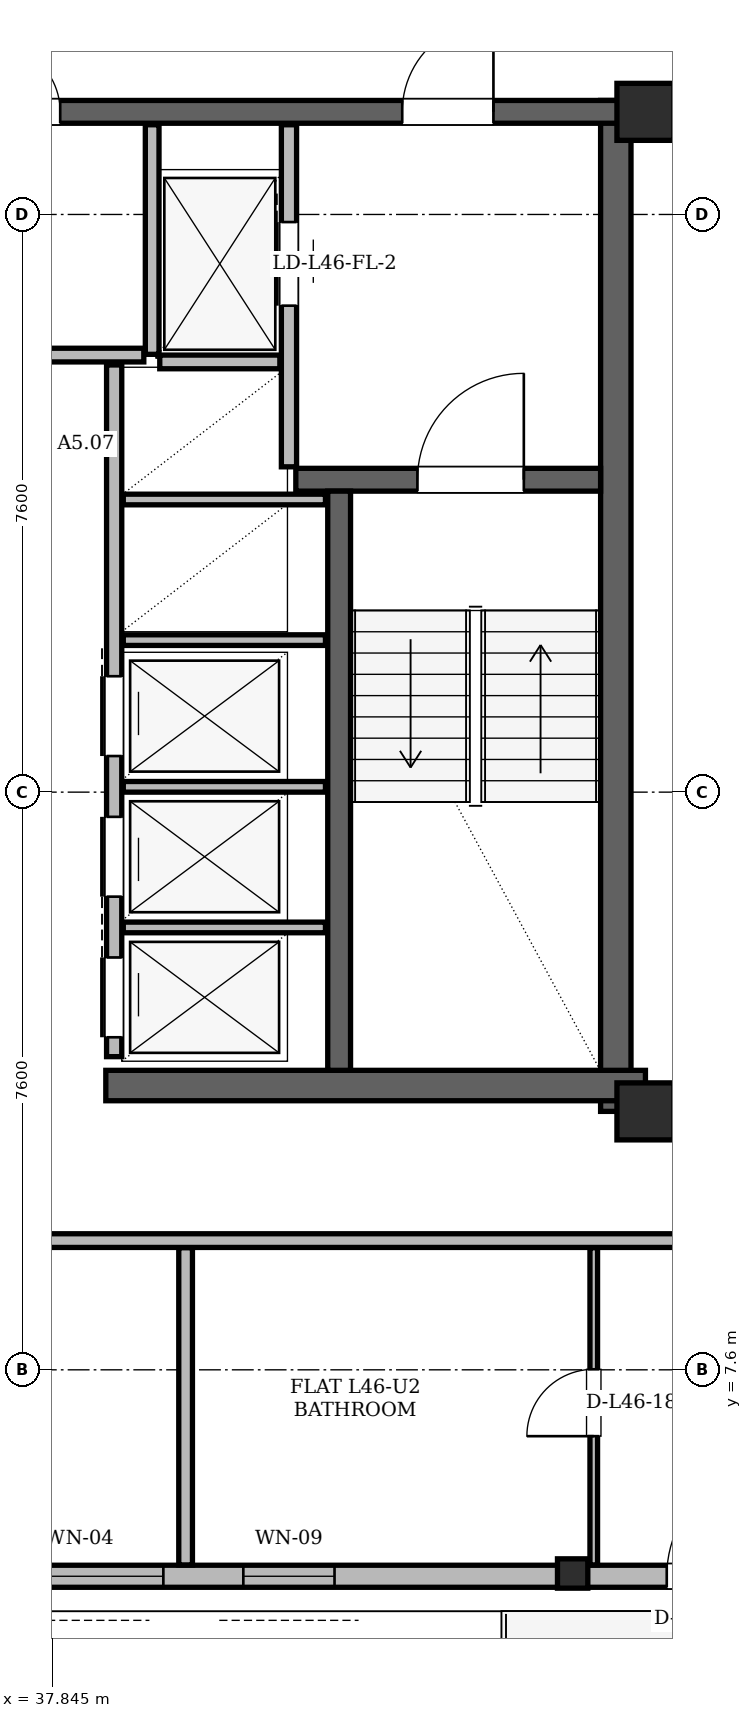
"""IFC4 building model, lengths in metres.
Left out: names, types, materials, properties, quantities, classifications, styles, units other than length and angle.
Written with IfcOpenShell. Run it as: python <this file> out.ifc"""

import sys

from ifc_helpers import new_model, si_unit, direction, frame, frame_2d, origin, origin_2d, place, context, subcontext, project, spatial, rectangle, hollow_rectangle, i_section, extrude, element, fill, save


model = new_model("IFC4")
c1 = context("Model", 3, precision=1e-05, world=origin(), true_north=direction((0.0, 1.0)))
c2 = subcontext(c1, "Body", "Model", "MODEL_VIEW")
j1 = project(units=[si_unit("LENGTHUNIT", "METRE"), si_unit("PLANEANGLEUNIT", "RADIAN")], contexts=[c1])
p1 = place(None, origin())
s1 = spatial("IfcSite", under=j1, at=p1, CompositionType="ELEMENT")
p2 = place(p1, origin())
s2 = spatial("IfcBuilding", under=s1, at=p2, CompositionType="ELEMENT")
p3 = place(p2, frame((0.0, 0.0, 174.6)))
s3 = spatial("IfcBuildingStorey", under=s2, at=p3, CompositionType="ELEMENT", Elevation=174.6)
for number, where, z_axis, x_axis in (
    (1, (45.65, 11.0, 0.0), (0.0, 0.0, 1.0), (1.0, 0.0, 0.0)),
    (2, (45.65, 24.15, 0.0), (0.0, 0.0, 1.0), (1.0, 0.0, 0.0)),
):
    element("IfcColumn", number, at=place(p3, frame(where, z_axis=z_axis, x_axis=x_axis)), inside=s3, PredefinedType="COLUMN", context=c2, shape_type="SweptSolid", body=[
        extrude(hollow_rectangle(XDim=0.75, YDim=0.75, WallThickness=0.06, at=origin_2d()), origin(), (0.0, 0.0, 1.0), 3.6),
    ])
p4 = place(p3, frame((44.686, 4.884, 0.004), z_axis=(0.00353450314, 0.020255421843, 0.99978859024), x_axis=(-0.985114547136, 0.171899182722, 0.0)))
e3 = element("IfcColumn", 3, at=p4, inside=s3, PredefinedType="COLUMN", context=c2, shape_type="SweptSolid", body=[
    extrude(i_section(OverallWidth=0.399, OverallDepth=0.386, WebThickness=0.021, FlangeThickness=0.033, at=origin_2d()), origin(), (0.0, 0.0, 1.0), 3.592),
])
p5 = place(p3, frame((45.26, 11.0, 0.0), z_axis=(0.0, 0.0, 1.0), x_axis=(0.0, 1.0, 0.0)))
e4 = element("IfcWall", 4, at=p5, inside=s3, PredefinedType="SHEAR", context=c2, shape_type="SweptSolid", body=[
    extrude(rectangle(XDim=13.3, YDim=0.4, at=frame_2d((6.65, 0.0))), origin(), (0.0, 0.0, 1.0), 3.38),
])
p6 = place(p3, frame((38.55, 11.34, 0.0), z_axis=(0.0, 0.0, 1.0), x_axis=(1.0, 0.0, 0.0)))
e5 = element("IfcWall", 5, at=p6, inside=s3, PredefinedType="SHEAR", context=c2, shape_type="SweptSolid", body=[
    extrude(rectangle(XDim=7.1, YDim=0.4, at=frame_2d((3.55, 0.0))), origin(), (0.0, 0.0, 1.0), 3.38),
])
p7 = place(p3, frame((29.65, 24.15, 0.0), z_axis=(0.0, 0.0, 1.0), x_axis=(1.0, 0.0, 0.0)))
e6 = element("IfcWall", 6, at=p7, inside=s3, PredefinedType="SHEAR", context=c2, shape_type="SweptSolid", body=[
    extrude(rectangle(XDim=15.7, YDim=0.3, at=frame_2d((7.85, 0.0))), origin(), (0.0, 0.0, 1.0), 3.38),
])
p8 = place(p7, frame((1.7, 0.0, 0.0)))
e7 = element("IfcOpeningElement", 7, at=p8, cuts=e6, PredefinedType="OPENING", context=c2, shape_type="SweptSolid", body=[
    extrude(rectangle(XDim=1.2, YDim=2.2, at=frame_2d((0.6, 1.1))), frame((0.0, 0.15, 0.0), z_axis=(0.0, -1.0, 0.0), x_axis=(1.0, 0.0, 0.0)), (0.0, 0.0, 1.0), 0.3),
])
p9 = place(p7, frame((12.8, 0.0, 0.0)))
e8 = element("IfcOpeningElement", 8, at=p9, cuts=e6, PredefinedType="OPENING", context=c2, shape_type="SweptSolid", body=[
    extrude(rectangle(XDim=1.2, YDim=2.2, at=frame_2d((0.6, 1.1))), frame((0.0, 0.15, 0.0), z_axis=(0.0, -1.0, 0.0), x_axis=(1.0, 0.0, 0.0)), (0.0, 0.0, 1.0), 0.3),
])
p10 = place(p7, frame((7.4, 0.0, 0.0)))
e9 = element("IfcOpeningElement", 9, at=p10, cuts=e6, PredefinedType="OPENING", context=c2, shape_type="SweptSolid", body=[
    extrude(rectangle(XDim=0.9, YDim=2.05, at=frame_2d((0.45, 1.025))), frame((0.0, 0.15, 0.0), z_axis=(0.0, -1.0, 0.0), x_axis=(1.0, 0.0, 0.0)), (0.0, 0.0, 1.0), 0.3),
])
p11 = place(p3, frame((41.05, 19.31, 0.0), z_axis=(0.0, 0.0, 1.0), x_axis=(1.0, 0.0, 0.0)))
e10 = element("IfcWall", 10, at=p11, inside=s3, PredefinedType="SHEAR", context=c2, shape_type="SweptSolid", body=[
    extrude(rectangle(XDim=4.01, YDim=0.3, at=frame_2d((2.005, 0.0))), origin(), (0.0, 0.0, 1.0), 3.38),
])
p12 = place(p11, frame((1.6, 0.0, 0.0)))
e11 = element("IfcOpeningElement", 11, at=p12, cuts=e10, PredefinedType="OPENING", context=c2, shape_type="SweptSolid", body=[
    extrude(rectangle(XDim=1.4, YDim=2.2, at=frame_2d((0.7, 1.1))), frame((0.0, 0.15, 0.0), z_axis=(0.0, -1.0, 0.0), x_axis=(1.0, 0.0, 0.0)), (0.0, 0.0, 1.0), 0.3),
])
p13 = place(p3, frame((41.62, 11.54, 0.0), z_axis=(0.0, 0.0, 1.0), x_axis=(0.0, 1.0, 0.0)))
e12 = element("IfcWall", 12, at=p13, inside=s3, PredefinedType="SHEAR", context=c2, shape_type="SweptSolid", body=[
    extrude(rectangle(XDim=7.62, YDim=0.3, at=frame_2d((3.81, 0.0))), origin(), (0.0, 0.0, 1.0), 3.38),
])
p14 = place(p3, frame((19.535, 4.884, 0.0), z_axis=(0.0, 0.0, 1.0), x_axis=(1.0, 0.0, 0.0)))
e13 = element("IfcWall", 13, at=p14, inside=s3, PredefinedType="SOLIDWALL", context=c2, shape_type="SweptSolid", body=[
    extrude(rectangle(XDim=35.93, YDim=0.29, at=frame_2d((17.965, 0.0))), origin(), (0.0, 0.0, 1.0), 2.6),
])
p15 = place(p14, frame((6.579, 0.0, 0.0)))
e14 = element("IfcOpeningElement", 14, at=p15, cuts=e13, PredefinedType="OPENING", context=c2, shape_type="SweptSolid", body=[
    extrude(rectangle(XDim=1.5, YDim=2.2, at=frame_2d((0.75, 1.1))), frame((0.0, 0.145, 0.0), z_axis=(0.0, -1.0, 0.0), x_axis=(1.0, 0.0, 0.0)), (0.0, 0.0, 1.0), 0.29),
])
p16 = place(p14, frame((26.395, 0.0, 0.0)))
e15 = element("IfcOpeningElement", 15, at=p16, cuts=e13, PredefinedType="OPENING", context=c2, shape_type="SweptSolid", body=[
    extrude(rectangle(XDim=1.5, YDim=2.2, at=frame_2d((0.75, 1.1))), frame((0.0, 0.145, 0.0), z_axis=(0.0, -1.0, 0.0), x_axis=(1.0, 0.0, 0.0)), (0.0, 0.0, 1.0), 0.29),
])
p17 = place(p14, frame((12.054, 0.0, 0.85)))
e16 = element("IfcOpeningElement", 16, at=p17, cuts=e13, PredefinedType="OPENING", context=c2, shape_type="SweptSolid", body=[
    extrude(rectangle(XDim=2.8, YDim=1.64, at=frame_2d((1.4, 0.82))), frame((0.0, 0.145, 0.0), z_axis=(0.0, -1.0, 0.0), x_axis=(1.0, 0.0, 0.0)), (0.0, 0.0, 1.0), 0.29),
])
p18 = place(p14, frame((17.572, 0.0, 0.85)))
e17 = element("IfcOpeningElement", 17, at=p18, cuts=e13, PredefinedType="OPENING", context=c2, shape_type="SweptSolid", body=[
    extrude(rectangle(XDim=2.2, YDim=1.64, at=frame_2d((1.1, 0.82))), frame((0.0, 0.145, 0.0), z_axis=(0.0, -1.0, 0.0), x_axis=(1.0, 0.0, 0.0)), (0.0, 0.0, 1.0), 0.29),
])
p19 = place(p14, frame((31.831, 0.0, 0.85)))
e18 = element("IfcOpeningElement", 18, at=p19, cuts=e13, PredefinedType="OPENING", context=c2, shape_type="SweptSolid", body=[
    extrude(rectangle(XDim=1.8, YDim=1.64, at=frame_2d((0.9, 0.82))), frame((0.0, 0.145, 0.0), z_axis=(0.0, -1.0, 0.0), x_axis=(1.0, 0.0, 0.0)), (0.0, 0.0, 1.0), 0.29),
])
p20 = place(p14, frame((20.824, 0.0, 0.85)))
e19 = element("IfcOpeningElement", 19, at=p20, cuts=e13, PredefinedType="OPENING", context=c2, shape_type="SweptSolid", body=[
    extrude(rectangle(XDim=1.2, YDim=1.48, at=frame_2d((0.6, 0.74))), frame((0.0, 0.145, 0.0), z_axis=(0.0, -1.0, 0.0), x_axis=(1.0, 0.0, 0.0)), (0.0, 0.0, 1.0), 0.29),
])
p21 = place(p14, frame((1.579, 0.0, 0.85)))
e20 = element("IfcOpeningElement", 20, at=p21, cuts=e13, PredefinedType="OPENING", context=c2, shape_type="SweptSolid", body=[
    extrude(rectangle(XDim=2.0, YDim=1.64, at=frame_2d((1.0, 0.82))), frame((0.0, 0.145, 0.0), z_axis=(0.0, -1.0, 0.0), x_axis=(1.0, 0.0, 0.0)), (0.0, 0.0, 1.0), 0.29),
])
p22 = place(p14, frame((0.53, 0.0, 0.85)))
e21 = element("IfcOpeningElement", 21, at=p22, cuts=e13, PredefinedType="OPENING", context=c2, shape_type="SweptSolid", body=[
    extrude(rectangle(XDim=0.7, YDim=1.2, at=frame_2d((0.35, 0.6))), frame((0.0, 0.145, 0.0), z_axis=(0.0, -1.0, 0.0), x_axis=(1.0, 0.0, 0.0)), (0.0, 0.0, 1.0), 0.29),
])
p23 = place(p3, frame((59.66, 12.15, 0.0), z_axis=(0.0, 0.0, 1.0), x_axis=(-0.499997724503, 0.866026717539, 0.0)))
e22 = element("IfcWall", 22, at=p23, inside=s3, PredefinedType="SOLIDWALL", context=c2, shape_type="SweptSolid", body=[
    extrude(rectangle(XDim=35.93, YDim=0.29, at=frame_2d((17.965, 0.0))), origin(), (0.0, 0.0, 1.0), 2.6),
])
p24 = place(p23, frame((6.579, 0.0, 0.0)))
e23 = element("IfcOpeningElement", 23, at=p24, cuts=e22, PredefinedType="OPENING", context=c2, shape_type="SweptSolid", body=[
    extrude(rectangle(XDim=1.5, YDim=2.2, at=frame_2d((0.75, 1.1))), frame((0.0, 0.145, 0.0), z_axis=(0.0, -1.0, 0.0), x_axis=(1.0, 0.0, 0.0)), (0.0, 0.0, 1.0), 0.29),
])
p25 = place(p23, frame((27.235, 0.0, 0.0)))
e24 = element("IfcOpeningElement", 24, at=p25, cuts=e22, PredefinedType="OPENING", context=c2, shape_type="SweptSolid", body=[
    extrude(rectangle(XDim=1.5, YDim=2.2, at=frame_2d((0.75, 1.1))), frame((0.0, 0.145, 0.0), z_axis=(0.0, -1.0, 0.0), x_axis=(1.0, 0.0, 0.0)), (0.0, 0.0, 1.0), 0.29),
])
p26 = place(p23, frame((33.046, 0.0, 0.85)))
e25 = element("IfcOpeningElement", 25, at=p26, cuts=e22, PredefinedType="OPENING", context=c2, shape_type="SweptSolid", body=[
    extrude(rectangle(XDim=1.2, YDim=1.48, at=frame_2d((0.6, 0.74))), frame((0.0, 0.145, 0.0), z_axis=(0.0, -1.0, 0.0), x_axis=(1.0, 0.0, 0.0)), (0.0, 0.0, 1.0), 0.29),
])
p27 = place(p23, frame((15.958, 0.0, 0.85)))
e26 = element("IfcOpeningElement", 26, at=p27, cuts=e22, PredefinedType="OPENING", context=c2, shape_type="SweptSolid", body=[
    extrude(rectangle(XDim=1.4, YDim=1.6, at=frame_2d((0.7, 0.8))), frame((0.0, 0.145, 0.0), z_axis=(0.0, -1.0, 0.0), x_axis=(1.0, 0.0, 0.0)), (0.0, 0.0, 1.0), 0.29),
])
p28 = place(p23, frame((21.417, 0.0, 0.85)))
e27 = element("IfcOpeningElement", 27, at=p28, cuts=e22, PredefinedType="OPENING", context=c2, shape_type="SweptSolid", body=[
    extrude(rectangle(XDim=2.5, YDim=1.64, at=frame_2d((1.25, 0.82))), frame((0.0, 0.145, 0.0), z_axis=(0.0, -1.0, 0.0), x_axis=(1.0, 0.0, 0.0)), (0.0, 0.0, 1.0), 0.29),
])
p29 = place(p3, frame((40.96, 19.48, 0.0), z_axis=(0.0, 0.0, 1.0), x_axis=(0.0, 1.0, 0.0)))
e28 = element("IfcWall", 28, at=p29, inside=s3, PredefinedType="PARTITIONING", context=c2, shape_type="SweptSolid", body=[
    extrude(rectangle(XDim=4.5, YDim=0.2, at=frame_2d((2.25, 0.0))), origin(), (0.0, 0.0, 1.0), 3.38),
])
p30 = place(p29, frame((2.12, 0.0, 0.0)))
e29 = element("IfcOpeningElement", 29, at=p30, cuts=e28, PredefinedType="OPENING", context=c2, shape_type="SweptSolid", body=[
    extrude(rectangle(XDim=1.1, YDim=2.2, at=frame_2d((0.55, 1.1))), frame((0.0, 0.1, 0.0), z_axis=(0.0, -1.0, 0.0), x_axis=(1.0, 0.0, 0.0)), (0.0, 0.0, 1.0), 0.2),
])
p31 = place(p3, frame((39.16, 20.96, 0.0), z_axis=(0.0, 0.0, 1.0), x_axis=(0.0, 1.0, 0.0)))
e30 = element("IfcWall", 30, at=p31, inside=s3, PredefinedType="PARTITIONING", context=c2, shape_type="SweptSolid", body=[
    extrude(rectangle(XDim=3.02, YDim=0.18, at=frame_2d((1.51, 0.0))), origin(), (0.0, 0.0, 1.0), 3.38),
])
p32 = place(p3, frame((39.26, 20.86, 0.0), z_axis=(0.0, 0.0, 1.0), x_axis=(1.0, 0.0, 0.0)))
e31 = element("IfcWall", 31, at=p32, inside=s3, PredefinedType="PARTITIONING", context=c2, shape_type="SweptSolid", body=[
    extrude(rectangle(XDim=1.58, YDim=0.18, at=frame_2d((0.79, 0.0))), origin(), (0.0, 0.0, 1.0), 3.38),
])
p33 = place(p3, frame((38.66, 11.72, 0.0), z_axis=(0.0, 0.0, 1.0), x_axis=(0.0, 1.0, 0.0)))
e32 = element("IfcWall", 32, at=p33, inside=s3, PredefinedType="PARTITIONING", context=c2, shape_type="SweptSolid", body=[
    extrude(rectangle(XDim=9.1, YDim=0.2, at=frame_2d((4.55, 0.0))), origin(), (0.0, 0.0, 1.0), 3.38),
])
p34 = place(p33, frame((0.255, 0.0, 0.0)))
e33 = element("IfcOpeningElement", 33, at=p34, cuts=e32, PredefinedType="OPENING", context=c2, shape_type="SweptSolid", body=[
    extrude(rectangle(XDim=1.05, YDim=2.15, at=frame_2d((0.525, 1.075))), frame((0.0, 0.1, 0.0), z_axis=(0.0, -1.0, 0.0), x_axis=(1.0, 0.0, 0.0)), (0.0, 0.0, 1.0), 0.2),
])
p35 = place(p33, frame((2.105, 0.0, 0.0)))
e34 = element("IfcOpeningElement", 34, at=p35, cuts=e32, PredefinedType="OPENING", context=c2, shape_type="SweptSolid", body=[
    extrude(rectangle(XDim=1.05, YDim=2.15, at=frame_2d((0.525, 1.075))), frame((0.0, 0.1, 0.0), z_axis=(0.0, -1.0, 0.0), x_axis=(1.0, 0.0, 0.0)), (0.0, 0.0, 1.0), 0.2),
])
p36 = place(p33, frame((3.955, 0.0, 0.0)))
e35 = element("IfcOpeningElement", 35, at=p36, cuts=e32, PredefinedType="OPENING", context=c2, shape_type="SweptSolid", body=[
    extrude(rectangle(XDim=1.05, YDim=2.15, at=frame_2d((0.525, 1.075))), frame((0.0, 0.1, 0.0), z_axis=(0.0, -1.0, 0.0), x_axis=(1.0, 0.0, 0.0)), (0.0, 0.0, 1.0), 0.2),
])
for number, where, z_axis, x_axis in (
    (36, (38.78, 13.42, 0.0), (0.0, 0.0, 1.0), (1.0, 0.0, 0.0)),
    (37, (38.78, 15.27, 0.0), (0.0, 0.0, 1.0), (1.0, 0.0, 0.0)),
    (38, (38.78, 17.2, 0.0), (0.0, 0.0, 1.0), (1.0, 0.0, 0.0)),
    (39, (38.78, 19.05, 0.0), (0.0, 0.0, 1.0), (1.0, 0.0, 0.0)),
):
    element("IfcWall", number, at=place(p3, frame(where, z_axis=z_axis, x_axis=x_axis)), inside=s3, PredefinedType="PARTITIONING", context=c2, shape_type="SweptSolid", body=[
        extrude(rectangle(XDim=2.66, YDim=0.14, at=frame_2d((1.33, 0.0))), origin(), (0.0, 0.0, 1.0), 3.38),
    ])
p37 = place(p3, frame((35.95, 20.95, 0.0), z_axis=(0.0, 0.0, 1.0), x_axis=(1.0, 0.0, 0.0)))
e40 = element("IfcWall", 40, at=p37, inside=s3, PredefinedType="PARTITIONING", context=c2, shape_type="SweptSolid", body=[
    extrude(rectangle(XDim=3.1, YDim=0.18, at=frame_2d((1.55, 0.0))), origin(), (0.0, 0.0, 1.0), 3.38),
])
p38 = place(p3, frame((27.55, 9.3, 0.0), z_axis=(0.0, 0.0, 1.0), x_axis=(1.0, 0.0, 0.0)))
e41 = element("IfcWall", 41, at=p38, inside=s3, PredefinedType="PARTITIONING", context=c2, shape_type="SweptSolid", body=[
    extrude(rectangle(XDim=21.25, YDim=0.18, at=frame_2d((10.625, 0.0))), origin(), (0.0, 0.0, 1.0), 2.842),
])
p39 = place(p38, frame((7.212, 0.0, 0.0)))
e42 = element("IfcOpeningElement", 42, at=p39, cuts=e41, PredefinedType="OPENING", context=c2, shape_type="SweptSolid", body=[
    extrude(rectangle(XDim=1.0, YDim=2.18, at=frame_2d((0.5, 1.09))), frame((0.0, 0.09, 0.0), z_axis=(0.0, -1.0, 0.0), x_axis=(1.0, 0.0, 0.0)), (0.0, 0.0, 1.0), 0.18),
])
p40 = place(p38, frame((18.672, 0.0, 0.0)))
e43 = element("IfcOpeningElement", 43, at=p40, cuts=e41, PredefinedType="OPENING", context=c2, shape_type="SweptSolid", body=[
    extrude(rectangle(XDim=1.0, YDim=2.18, at=frame_2d((0.5, 1.09))), frame((0.0, 0.09, 0.0), z_axis=(0.0, -1.0, 0.0), x_axis=(1.0, 0.0, 0.0)), (0.0, 0.0, 1.0), 0.18),
])
p41 = place(p3, frame((39.6, 5.033, 0.0), z_axis=(0.0, 0.0, 1.0), x_axis=(0.0, 1.0, 0.0)))
e44 = element("IfcWall", 44, at=p41, inside=s3, PredefinedType="PARTITIONING", context=c2, shape_type="SweptSolid", body=[
    extrude(rectangle(XDim=4.173, YDim=0.18, at=frame_2d((2.086, 0.0))), origin(), (0.0, 0.0, 1.0), 3.38),
])
p42 = place(p3, frame((44.97, 5.033, 0.0), z_axis=(0.0, 0.0, 1.0), x_axis=(0.0, 1.0, 0.0)))
e45 = element("IfcWall", 45, at=p42, inside=s3, PredefinedType="PARTITIONING", context=c2, shape_type="SweptSolid", body=[
    extrude(rectangle(XDim=4.173, YDim=0.1, at=frame_2d((2.086, 0.0))), origin(), (0.0, 0.0, 1.0), 3.38),
])
p43 = place(p42, frame((1.694, 0.0, 0.0)))
e46 = element("IfcOpeningElement", 46, at=p43, cuts=e45, PredefinedType="OPENING", context=c2, shape_type="SweptSolid", body=[
    extrude(rectangle(XDim=0.88, YDim=2.08, at=frame_2d((0.44, 1.04))), frame((0.0, 0.05, 0.0), z_axis=(0.0, -1.0, 0.0), x_axis=(1.0, 0.0, 0.0)), (0.0, 0.0, 1.0), 0.1),
])
p44 = place(p16, origin())
e47 = element("IfcDoor", 47, at=p44, inside=s3, OperationType="SINGLE_SWING_RIGHT", PredefinedType="DOOR", context=c2, shape_type="SweptSolid", body=[
    extrude(rectangle(XDim=1.5, YDim=2.2, at=frame_2d((0.75, 1.1))), frame((0.0, 0.025, 0.0), z_axis=(0.0, -1.0, 0.0), x_axis=(1.0, 0.0, 0.0)), (0.0, 0.0, 1.0), 0.05),
])
fill(e15, e47)
p45 = place(p18, origin())
e48 = element("IfcWindow", 48, at=p45, inside=s3, PartitioningType="SINGLE_PANEL", PredefinedType="WINDOW", context=c2, shape_type="SweptSolid", body=[
    extrude(rectangle(XDim=2.2, YDim=1.64, at=frame_2d((1.1, 0.82))), frame((0.0, 0.03, 0.0), z_axis=(0.0, -1.0, 0.0), x_axis=(1.0, 0.0, 0.0)), (0.0, 0.0, 1.0), 0.06),
])
fill(e17, e48)
p46 = place(p20, origin())
e49 = element("IfcWindow", 49, at=p46, inside=s3, PartitioningType="SINGLE_PANEL", PredefinedType="WINDOW", context=c2, shape_type="SweptSolid", body=[
    extrude(rectangle(XDim=1.2, YDim=1.48, at=frame_2d((0.6, 0.74))), frame((0.0, 0.03, 0.0), z_axis=(0.0, -1.0, 0.0), x_axis=(1.0, 0.0, 0.0)), (0.0, 0.0, 1.0), 0.06),
])
fill(e19, e49)
p47 = place(p30, origin())
e50 = element("IfcDoor", 50, at=p47, inside=s3, OperationType="SLIDING_TO_RIGHT", PredefinedType="DOOR", context=c2, shape_type="SweptSolid", body=[
    extrude(rectangle(XDim=1.1, YDim=2.2, at=frame_2d((0.55, 1.1))), frame((0.0, 0.025, 0.0), z_axis=(0.0, -1.0, 0.0), x_axis=(1.0, 0.0, 0.0)), (0.0, 0.0, 1.0), 0.05),
])
fill(e29, e50)
p48 = place(p34, origin())
e51 = element("IfcDoor", 51, at=p48, inside=s3, OperationType="SLIDING_TO_RIGHT", PredefinedType="DOOR", context=c2, shape_type="SweptSolid", body=[
    extrude(rectangle(XDim=1.05, YDim=2.15, at=frame_2d((0.525, 1.075))), frame((0.0, 0.025, 0.0), z_axis=(0.0, -1.0, 0.0), x_axis=(1.0, 0.0, 0.0)), (0.0, 0.0, 1.0), 0.05),
])
fill(e33, e51)
p49 = place(p35, origin())
e52 = element("IfcDoor", 52, at=p49, inside=s3, OperationType="SLIDING_TO_LEFT", PredefinedType="DOOR", context=c2, shape_type="SweptSolid", body=[
    extrude(rectangle(XDim=1.05, YDim=2.15, at=frame_2d((0.525, 1.075))), frame((0.0, 0.025, 0.0), z_axis=(0.0, -1.0, 0.0), x_axis=(1.0, 0.0, 0.0)), (0.0, 0.0, 1.0), 0.05),
])
fill(e34, e52)
p50 = place(p36, origin())
e53 = element("IfcDoor", 53, at=p50, inside=s3, OperationType="SLIDING_TO_RIGHT", PredefinedType="DOOR", context=c2, shape_type="SweptSolid", body=[
    extrude(rectangle(XDim=1.05, YDim=2.15, at=frame_2d((0.525, 1.075))), frame((0.0, 0.025, 0.0), z_axis=(0.0, -1.0, 0.0), x_axis=(1.0, 0.0, 0.0)), (0.0, 0.0, 1.0), 0.05),
])
fill(e35, e53)
p51 = place(p12, origin())
e54 = element("IfcDoor", 54, at=p51, inside=s3, OperationType="SINGLE_SWING_RIGHT", PredefinedType="DOOR", context=c2, shape_type="SweptSolid", body=[
    extrude(rectangle(XDim=1.4, YDim=2.2, at=frame_2d((0.7, 1.1))), frame((0.0, 0.025, 0.0), z_axis=(0.0, -1.0, 0.0), x_axis=(1.0, 0.0, 0.0)), (0.0, 0.0, 1.0), 0.05),
])
fill(e11, e54)
p52 = place(p9, origin())
e55 = element("IfcDoor", 55, at=p52, inside=s3, OperationType="SINGLE_SWING_RIGHT", PredefinedType="DOOR", context=c2, shape_type="SweptSolid", body=[
    extrude(rectangle(XDim=1.2, YDim=2.2, at=frame_2d((0.6, 1.1))), frame((0.0, 0.025, 0.0), z_axis=(0.0, -1.0, 0.0), x_axis=(1.0, 0.0, 0.0)), (0.0, 0.0, 1.0), 0.05),
])
fill(e8, e55)
p53 = place(p10, origin())
e56 = element("IfcDoor", 56, at=p53, inside=s3, OperationType="SINGLE_SWING_LEFT", PredefinedType="DOOR", context=c2, shape_type="SweptSolid", body=[
    extrude(rectangle(XDim=0.9, YDim=2.05, at=frame_2d((0.45, 1.025))), frame((0.0, 0.025, 0.0), z_axis=(0.0, -1.0, 0.0), x_axis=(1.0, 0.0, 0.0)), (0.0, 0.0, 1.0), 0.05),
])
fill(e9, e56)
p54 = place(p43, origin())
e57 = element("IfcDoor", 57, at=p54, inside=s3, OperationType="SINGLE_SWING_LEFT", PredefinedType="DOOR", context=c2, shape_type="SweptSolid", body=[
    extrude(rectangle(XDim=0.88, YDim=2.08, at=frame_2d((0.44, 1.04))), frame((0.0, 0.025, 0.0), z_axis=(0.0, -1.0, 0.0), x_axis=(1.0, 0.0, 0.0)), (0.0, 0.0, 1.0), 0.05),
])
fill(e46, e57)
save(model, sys.argv[1])
